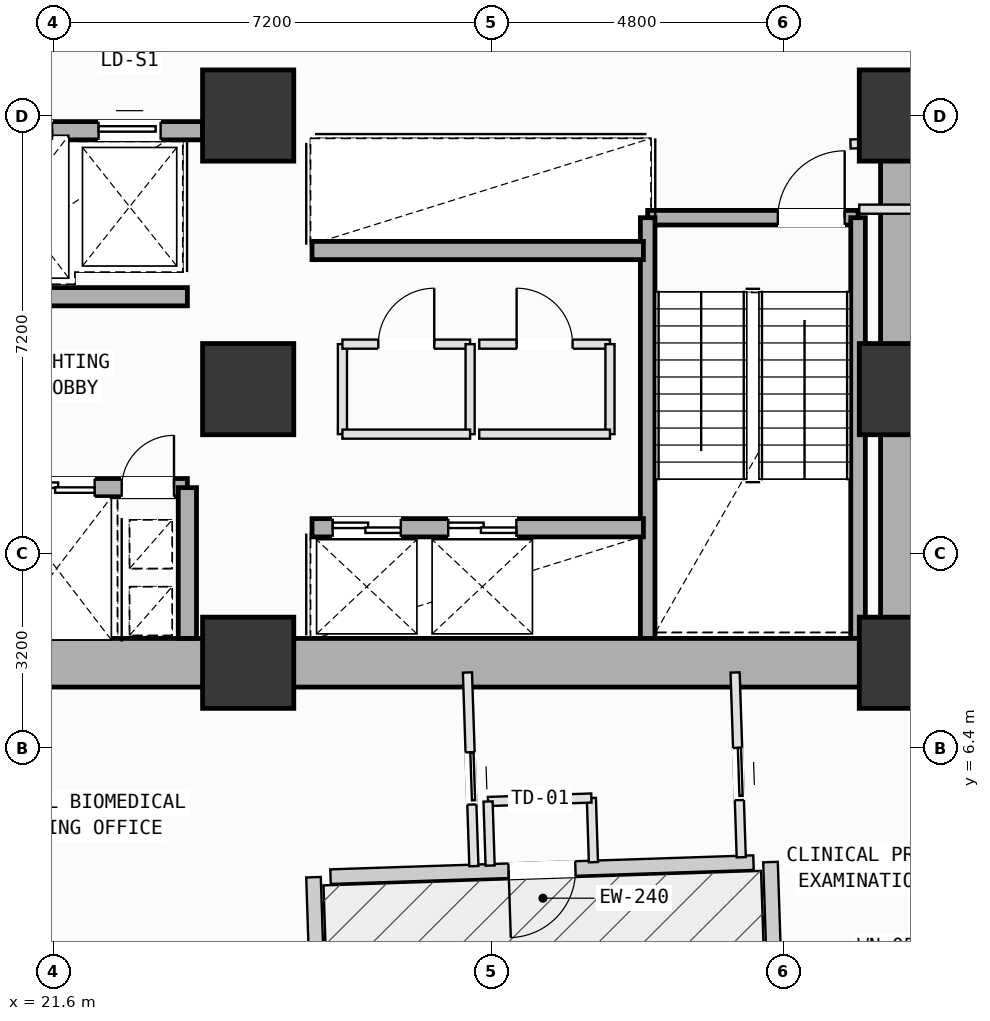
"""IFC4 building model, lengths in metres.
Left out: names, types, materials, properties, quantities, classifications, styles, units other than length and angle.
Written with IfcOpenShell. Run it as: python <this file> out.ifc"""

import sys

from ifc_helpers import new_model, si_unit, direction, frame, frame_2d, origin, origin_2d, place, context, subcontext, project, spatial, rectangle, extrude, element, fill, save


model = new_model("IFC4")
c1 = context("Model", 3, precision=1e-05, world=origin(), true_north=direction((0.0, 1.0)))
c2 = subcontext(c1, "Body", "Model", "MODEL_VIEW")
j1 = project(units=[si_unit("LENGTHUNIT", "METRE"), si_unit("PLANEANGLEUNIT", "RADIAN")], contexts=[c1])
p1 = place(None, origin())
s1 = spatial("IfcSite", under=j1, at=p1, CompositionType="ELEMENT")
p2 = place(p1, origin())
s2 = spatial("IfcBuilding", under=s1, at=p2, CompositionType="ELEMENT")
p3 = place(p2, frame((0.0, 0.0, 31.0)))
s3 = spatial("IfcBuildingStorey", under=s2, at=p3, CompositionType="ELEMENT", Elevation=31.0)
for number, where, z_axis, x_axis in (
    (1, (24.8, 7.8, 0.0), (0.0, 0.0, 1.0), (1.0, 0.0, 0.0)),
    (2, (24.8, 12.3, 0.0), (0.0, 0.0, 1.0), (1.0, 0.0, 0.0)),
    (3, (24.8, 16.8, 0.0), (0.0, 0.0, 1.0), (1.0, 0.0, 0.0)),
    (4, (35.6, 7.8, 0.0), (0.0, 0.0, 1.0), (1.0, 0.0, 0.0)),
    (5, (35.6, 12.3, 0.0), (0.0, 0.0, 1.0), (1.0, 0.0, 0.0)),
    (6, (35.6, 16.8, 0.0), (0.0, 0.0, 1.0), (1.0, 0.0, 0.0)),
):
    element("IfcColumn", number, at=place(p3, frame(where, z_axis=z_axis, x_axis=x_axis)), inside=s3, PredefinedType="COLUMN", context=c2, shape_type="SweptSolid", body=[
        extrude(rectangle(XDim=1.5, YDim=1.5, at=origin_2d()), origin(), (0.0, 0.0, 1.0), 4.0),
    ])
p4 = place(p3, frame((31.539, 2.469, 0.002), z_axis=(0.092271359153, -0.007785586006, 0.995703460339), x_axis=(0.051136235905, 0.998686967769, 0.003070144289)))
e7 = element("IfcColumn", 7, at=p4, inside=s3, PredefinedType="COLUMN", context=c2, shape_type="SweptSolid", body=[
    extrude(rectangle(XDim=1.6, YDim=0.9, at=origin_2d()), origin(), (0.0, 0.0, 1.0), 4.014),
])
p5 = place(p3, frame((33.11, 4.513, 0.0), z_axis=(0.0, 0.0, 1.0), x_axis=(-0.999450421649, -0.033148976852, 0.0)))
e8 = element("IfcWall", 8, at=p5, inside=s3, PredefinedType="SOLIDWALL", context=c2, shape_type="SweptSolid", body=[
    extrude(rectangle(XDim=6.96, YDim=0.24, at=frame_2d((3.48, 0.0))), origin(), (0.0, 0.0, 1.0), 3.165),
])
p6 = place(p5, frame((2.93, 0.0, 0.0)))
e9 = element("IfcOpeningElement", 9, at=p6, cuts=e8, PredefinedType="OPENING", context=c2, shape_type="SweptSolid", body=[
    extrude(rectangle(XDim=1.1, YDim=2.15, at=frame_2d((0.55, 1.075))), frame((0.0, 0.13, 0.0), z_axis=(0.0, -1.0, 0.0), x_axis=(1.0, 0.0, 0.0)), (0.0, 0.0, 1.0), 0.26),
])
for number, where, z_axis, x_axis in (
    (10, (25.874, 4.273, 0.0), (0.0, 0.0, 1.0), (0.033, -0.999, 0.0)),
    (11, (33.473, 2.023, 0.0), (0.0, 0.0, 1.0), (-0.033, 0.999, 0.0)),
):
    element("IfcWall", number, at=place(p3, frame(where, z_axis=z_axis, x_axis=x_axis)), inside=s3, PredefinedType="SOLIDWALL", context=c2, shape_type="SweptSolid", body=[
        extrude(rectangle(XDim=2.5, YDim=0.24, at=frame_2d((1.25, 0.0))), origin(), (0.0, 0.0, 1.0), 3.165),
    ])
p7 = place(p3, frame((31.37, 15.12, 0.0), z_axis=(0.0, 0.0, 1.0), x_axis=(1.0, 0.0, 0.0)))
e12 = element("IfcWall", 12, at=p7, inside=s3, PredefinedType="SOLIDWALL", context=c2, shape_type="SweptSolid", body=[
    extrude(rectangle(XDim=3.46, YDim=0.24, at=frame_2d((1.73, 0.0))), origin(), (0.0, 0.0, 1.0), 3.78),
])
p8 = place(p7, frame((2.14, 0.0, 0.0)))
e13 = element("IfcOpeningElement", 13, at=p8, cuts=e12, PredefinedType="OPENING", context=c2, shape_type="SweptSolid", body=[
    extrude(rectangle(XDim=1.1, YDim=2.15, at=frame_2d((0.55, 1.075))), frame((0.0, 0.13, 0.0), z_axis=(0.0, -1.0, 0.0), x_axis=(1.0, 0.0, 0.0)), (0.0, 0.0, 1.0), 0.26),
])
for number, where, z_axis, x_axis in (
    (14, (34.83, 15.12, 0.0), (0.0, 0.0, 1.0), (0.0, -1.0, 0.0)),
    (15, (31.37, 8.2, 0.0), (0.0, 0.0, 1.0), (0.0, 1.0, 0.0)),
):
    element("IfcWall", number, at=place(p3, frame(where, z_axis=z_axis, x_axis=x_axis)), inside=s3, PredefinedType="SOLIDWALL", context=c2, shape_type="SweptSolid", body=[
        extrude(rectangle(XDim=6.92, YDim=0.24, at=frame_2d((3.46, 0.0))), origin(), (0.0, 0.0, 1.0), 3.78),
    ])
for number, where, z_axis, x_axis in (
    (16, (14.0, 7.8, 0.0), (0.0, 0.0, 1.0), (1.0, 0.0, 0.0)),
    (17, (24.8, 7.8, 0.0), (0.0, 0.0, 1.0), (1.0, 0.0, 0.0)),
):
    element("IfcWall", number, at=place(p3, frame(where, z_axis=z_axis, x_axis=x_axis)), inside=s3, PredefinedType="SHEAR", context=c2, shape_type="SweptSolid", body=[
        extrude(rectangle(XDim=10.8, YDim=0.8, at=frame_2d((5.4, 0.0))), origin(), (0.0, 0.0, 1.0), 3.78),
    ])
p9 = place(p3, frame((35.6, 7.8, 0.0), z_axis=(0.0, 0.0, 1.0), x_axis=(0.0, 1.0, 0.0)))
e18 = element("IfcWall", 18, at=p9, inside=s3, PredefinedType="SHEAR", context=c2, shape_type="SweptSolid", body=[
    extrude(rectangle(XDim=9.0, YDim=0.8, at=frame_2d((4.5, 0.0))), origin(), (0.0, 0.0, 1.0), 3.78),
])
p10 = place(p3, frame((19.85, 16.55, 0.0), z_axis=(0.0, 0.0, 1.0), x_axis=(1.0, 0.0, 0.0)))
e19 = element("IfcWall", 19, at=p10, inside=s3, PredefinedType="SOLIDWALL", context=c2, shape_type="SweptSolid", body=[
    extrude(rectangle(XDim=4.2, YDim=0.3, at=frame_2d((2.1, 0.0))), origin(), (0.0, 0.0, 1.0), 3.78),
])
p11 = place(p10, frame((0.475, 0.0, 0.0)))
e20 = element("IfcOpeningElement", 20, at=p11, cuts=e19, PredefinedType="OPENING", context=c2, shape_type="SweptSolid", body=[
    extrude(rectangle(XDim=1.25, YDim=2.18, at=frame_2d((0.625, 1.09))), frame((0.0, 0.16, 0.0), z_axis=(0.0, -1.0, 0.0), x_axis=(1.0, 0.0, 0.0)), (0.0, 0.0, 1.0), 0.32),
])
p12 = place(p10, frame((2.49, 0.0, 0.0)))
e21 = element("IfcOpeningElement", 21, at=p12, cuts=e19, PredefinedType="OPENING", context=c2, shape_type="SweptSolid", body=[
    extrude(rectangle(XDim=1.02, YDim=2.12, at=frame_2d((0.51, 1.06))), frame((0.0, 0.16, 0.0), z_axis=(0.0, -1.0, 0.0), x_axis=(1.0, 0.0, 0.0)), (0.0, 0.0, 1.0), 0.32),
])
p13 = place(p3, frame((18.5, 10.68, 0.0), z_axis=(0.0, 0.0, 1.0), x_axis=(1.0, 0.0, 0.0)))
e22 = element("IfcWall", 22, at=p13, inside=s3, PredefinedType="SOLIDWALL", context=c2, shape_type="SweptSolid", body=[
    extrude(rectangle(XDim=5.3, YDim=0.3, at=frame_2d((2.65, 0.0))), origin(), (0.0, 0.0, 1.0), 3.78),
])
p14 = place(p13, frame((4.22, 0.0, 0.0)))
e23 = element("IfcOpeningElement", 23, at=p14, cuts=e22, PredefinedType="OPENING", context=c2, shape_type="SweptSolid", body=[
    extrude(rectangle(XDim=0.86, YDim=2.06, at=frame_2d((0.43, 1.03))), frame((0.0, 0.16, 0.0), z_axis=(0.0, -1.0, 0.0), x_axis=(1.0, 0.0, 0.0)), (0.0, 0.0, 1.0), 0.32),
])
p15 = place(p13, frame((0.425, 0.0, 0.0)))
e24 = element("IfcOpeningElement", 24, at=p15, cuts=e22, PredefinedType="OPENING", context=c2, shape_type="SweptSolid", body=[
    extrude(rectangle(XDim=1.25, YDim=2.18, at=frame_2d((0.625, 1.09))), frame((0.0, 0.16, 0.0), z_axis=(0.0, -1.0, 0.0), x_axis=(1.0, 0.0, 0.0)), (0.0, 0.0, 1.0), 0.32),
])
p16 = place(p13, frame((2.525, 0.0, 0.0)))
e25 = element("IfcOpeningElement", 25, at=p16, cuts=e22, PredefinedType="OPENING", context=c2, shape_type="SweptSolid", body=[
    extrude(rectangle(XDim=1.25, YDim=2.18, at=frame_2d((0.625, 1.09))), frame((0.0, 0.16, 0.0), z_axis=(0.0, -1.0, 0.0), x_axis=(1.0, 0.0, 0.0)), (0.0, 0.0, 1.0), 0.32),
])
p17 = place(p3, frame((18.5, 13.82, 0.0), z_axis=(0.0, 0.0, 1.0), x_axis=(1.0, 0.0, 0.0)))
e26 = element("IfcWall", 26, at=p17, inside=s3, PredefinedType="SOLIDWALL", context=c2, shape_type="SweptSolid", body=[
    extrude(rectangle(XDim=5.3, YDim=0.3, at=frame_2d((2.65, 0.0))), origin(), (0.0, 0.0, 1.0), 3.78),
])
p18 = place(p17, frame((0.18, 0.0, 0.0)))
e27 = element("IfcOpeningElement", 27, at=p18, cuts=e26, PredefinedType="OPENING", context=c2, shape_type="SweptSolid", body=[
    extrude(rectangle(XDim=1.1, YDim=2.15, at=frame_2d((0.55, 1.075))), frame((0.0, 0.16, 0.0), z_axis=(0.0, -1.0, 0.0), x_axis=(1.0, 0.0, 0.0)), (0.0, 0.0, 1.0), 0.32),
])
p19 = place(p3, frame((23.8, 8.2, 0.0), z_axis=(0.0, 0.0, 1.0), x_axis=(0.0, 1.0, 0.0)))
e28 = element("IfcWall", 28, at=p19, inside=s3, PredefinedType="SOLIDWALL", context=c2, shape_type="SweptSolid", body=[
    extrude(rectangle(XDim=2.48, YDim=0.3, at=frame_2d((1.24, 0.0))), origin(), (0.0, 0.0, 1.0), 3.78),
])
p20 = place(p3, frame((25.85, 10.02, 0.0), z_axis=(0.0, 0.0, 1.0), x_axis=(1.0, 0.0, 0.0)))
e29 = element("IfcWall", 29, at=p20, inside=s3, PredefinedType="SOLIDWALL", context=c2, shape_type="SweptSolid", body=[
    extrude(rectangle(XDim=5.45, YDim=0.3, at=frame_2d((2.725, 0.0))), origin(), (0.0, 0.0, 1.0), 3.78),
])
p21 = place(p20, frame((0.34, 0.0, 0.0)))
e30 = element("IfcOpeningElement", 30, at=p21, cuts=e29, PredefinedType="OPENING", context=c2, shape_type="SweptSolid", body=[
    extrude(rectangle(XDim=1.12, YDim=2.15, at=frame_2d((0.56, 1.075))), frame((0.0, 0.16, 0.0), z_axis=(0.0, -1.0, 0.0), x_axis=(1.0, 0.0, 0.0)), (0.0, 0.0, 1.0), 0.32),
])
p22 = place(p20, frame((2.24, 0.0, 0.0)))
e31 = element("IfcOpeningElement", 31, at=p22, cuts=e29, PredefinedType="OPENING", context=c2, shape_type="SweptSolid", body=[
    extrude(rectangle(XDim=1.12, YDim=2.15, at=frame_2d((0.56, 1.075))), frame((0.0, 0.16, 0.0), z_axis=(0.0, -1.0, 0.0), x_axis=(1.0, 0.0, 0.0)), (0.0, 0.0, 1.0), 0.32),
])
p23 = place(p3, frame((25.85, 14.58, 0.0), z_axis=(0.0, 0.0, 1.0), x_axis=(1.0, 0.0, 0.0)))
e32 = element("IfcWall", 32, at=p23, inside=s3, PredefinedType="SOLIDWALL", context=c2, shape_type="SweptSolid", body=[
    extrude(rectangle(XDim=5.45, YDim=0.3, at=frame_2d((2.725, 0.0))), origin(), (0.0, 0.0, 1.0), 3.78),
])
p24 = place(p3, frame((26.35, 11.56, 0.0), z_axis=(0.0, 0.0, 1.0), x_axis=(0.0, 1.0, 0.0)))
e33 = element("IfcWall", 33, at=p24, inside=s3, PredefinedType="PARTITIONING", context=c2, shape_type="SweptSolid", body=[
    extrude(rectangle(XDim=1.48, YDim=0.15, at=frame_2d((0.74, 0.0))), origin(), (0.0, 0.0, 1.0), 3.78),
])
p25 = place(p3, frame((26.35, 13.04, 0.0), z_axis=(0.0, 0.0, 1.0), x_axis=(1.0, 0.0, 0.0)))
e34 = element("IfcWall", 34, at=p25, inside=s3, PredefinedType="PARTITIONING", context=c2, shape_type="SweptSolid", body=[
    extrude(rectangle(XDim=2.1, YDim=0.15, at=frame_2d((1.05, 0.0))), origin(), (0.0, 0.0, 1.0), 3.78),
])
p26 = place(p25, frame((0.59, 0.0, 0.0)))
e35 = element("IfcOpeningElement", 35, at=p26, cuts=e34, PredefinedType="OPENING", context=c2, shape_type="SweptSolid", body=[
    extrude(rectangle(XDim=0.92, YDim=2.1, at=frame_2d((0.46, 1.05))), frame((0.0, 0.085, 0.0), z_axis=(0.0, -1.0, 0.0), x_axis=(1.0, 0.0, 0.0)), (0.0, 0.0, 1.0), 0.17),
])
p27 = place(p3, frame((28.45, 13.04, 0.0), z_axis=(0.0, 0.0, 1.0), x_axis=(0.0, -1.0, 0.0)))
e36 = element("IfcWall", 36, at=p27, inside=s3, PredefinedType="PARTITIONING", context=c2, shape_type="SweptSolid", body=[
    extrude(rectangle(XDim=1.48, YDim=0.15, at=frame_2d((0.74, 0.0))), origin(), (0.0, 0.0, 1.0), 3.78),
])
p28 = place(p3, frame((28.45, 11.56, 0.0), z_axis=(0.0, 0.0, 1.0), x_axis=(-1.0, 0.0, 0.0)))
e37 = element("IfcWall", 37, at=p28, inside=s3, PredefinedType="PARTITIONING", context=c2, shape_type="SweptSolid", body=[
    extrude(rectangle(XDim=2.1, YDim=0.15, at=frame_2d((1.05, 0.0))), origin(), (0.0, 0.0, 1.0), 3.78),
])
p29 = place(p3, frame((28.6, 13.04, 0.0), z_axis=(0.0, 0.0, 1.0), x_axis=(1.0, 0.0, 0.0)))
e38 = element("IfcWall", 38, at=p29, inside=s3, PredefinedType="PARTITIONING", context=c2, shape_type="SweptSolid", body=[
    extrude(rectangle(XDim=2.15, YDim=0.15, at=frame_2d((1.075, 0.0))), origin(), (0.0, 0.0, 1.0), 3.78),
])
p30 = place(p29, frame((0.615, 0.0, 0.0)))
e39 = element("IfcOpeningElement", 39, at=p30, cuts=e38, PredefinedType="OPENING", context=c2, shape_type="SweptSolid", body=[
    extrude(rectangle(XDim=0.92, YDim=2.1, at=frame_2d((0.46, 1.05))), frame((0.0, 0.085, 0.0), z_axis=(0.0, -1.0, 0.0), x_axis=(1.0, 0.0, 0.0)), (0.0, 0.0, 1.0), 0.17),
])
p31 = place(p3, frame((30.75, 13.04, 0.0), z_axis=(0.0, 0.0, 1.0), x_axis=(0.0, -1.0, 0.0)))
e40 = element("IfcWall", 40, at=p31, inside=s3, PredefinedType="PARTITIONING", context=c2, shape_type="SweptSolid", body=[
    extrude(rectangle(XDim=1.48, YDim=0.15, at=frame_2d((0.74, 0.0))), origin(), (0.0, 0.0, 1.0), 3.78),
])
p32 = place(p3, frame((30.75, 11.56, 0.0), z_axis=(0.0, 0.0, 1.0), x_axis=(-1.0, 0.0, 0.0)))
e41 = element("IfcWall", 41, at=p32, inside=s3, PredefinedType="PARTITIONING", context=c2, shape_type="SweptSolid", body=[
    extrude(rectangle(XDim=2.15, YDim=0.15, at=frame_2d((1.075, 0.0))), origin(), (0.0, 0.0, 1.0), 3.78),
])
p33 = place(p3, frame((28.406, 7.64, 0.0), z_axis=(0.0, 0.0, 1.0), x_axis=(0.033251054915, -0.999447030786, 0.0)))
e42 = element("IfcWall", 42, at=p33, inside=s3, PredefinedType="PARTITIONING", context=c2, shape_type="SweptSolid", body=[
    extrude(rectangle(XDim=3.187, YDim=0.15, at=frame_2d((1.593, 0.0))), origin(), (0.0, 0.0, 1.0), 3.78),
])
p34 = place(p33, frame((1.313, 0.0, 0.0)))
e43 = element("IfcOpeningElement", 43, at=p34, cuts=e42, PredefinedType="OPENING", context=c2, shape_type="SweptSolid", body=[
    extrude(rectangle(XDim=0.86, YDim=2.06, at=frame_2d((0.43, 1.03))), frame((0.0, 0.085, 0.0), z_axis=(0.0, -1.0, 0.0), x_axis=(1.0, 0.0, 0.0)), (0.0, 0.0, 1.0), 0.17),
])
p35 = place(p3, frame((32.808, 7.64, 0.0), z_axis=(0.0, 0.0, 1.0), x_axis=(0.033162435907, -0.999449975159, 0.0)))
e44 = element("IfcWall", 44, at=p35, inside=s3, PredefinedType="PARTITIONING", context=c2, shape_type="SweptSolid", body=[
    extrude(rectangle(XDim=3.041, YDim=0.15, at=frame_2d((1.52, 0.0))), origin(), (0.0, 0.0, 1.0), 3.78),
])
p36 = place(p35, frame((1.24, 0.0, 0.0)))
e45 = element("IfcOpeningElement", 45, at=p36, cuts=e44, PredefinedType="OPENING", context=c2, shape_type="SweptSolid", body=[
    extrude(rectangle(XDim=0.86, YDim=2.06, at=frame_2d((0.43, 1.03))), frame((0.0, 0.085, 0.0), z_axis=(0.0, -1.0, 0.0), x_axis=(1.0, 0.0, 0.0)), (0.0, 0.0, 1.0), 0.17),
])
p37 = place(p3, frame((30.478, 4.52, 0.0), z_axis=(0.0, 0.0, 1.0), x_axis=(-0.032151848276, 0.999482995679, 0.0)))
e46 = element("IfcWall", 46, at=p37, inside=s3, PredefinedType="PARTITIONING", context=c2, shape_type="SweptSolid", body=[
    extrude(rectangle(XDim=1.055, YDim=0.15, at=frame_2d((0.528, 0.0))), origin(), (0.0, 0.0, 1.0), 3.78),
])
p38 = place(p3, frame((30.444, 5.575, 0.0), z_axis=(0.0, 0.0, 1.0), x_axis=(-0.999439954622, -0.033463070761, 0.0)))
e47 = element("IfcWall", 47, at=p38, inside=s3, PredefinedType="PARTITIONING", context=c2, shape_type="SweptSolid", body=[
    extrude(rectangle(XDim=1.7, YDim=0.15, at=frame_2d((0.85, 0.0))), origin(), (0.0, 0.0, 1.0), 3.78),
])
p39 = place(p3, frame((28.745, 5.518, 0.0), z_axis=(0.0, 0.0, 1.0), x_axis=(0.032181608355, -0.999482037899, 0.0)))
e48 = element("IfcWall", 48, at=p39, inside=s3, PredefinedType="PARTITIONING", context=c2, shape_type="SweptSolid", body=[
    extrude(rectangle(XDim=1.054, YDim=0.15, at=frame_2d((0.527, 0.0))), origin(), (0.0, 0.0, 1.0), 3.78),
])
p40 = place(p3, frame((35.6, 7.5, 0.0), z_axis=(0.0, 0.0, 1.0), x_axis=(1.0, 0.0, 0.0)))
e49 = element("IfcWall", 49, at=p40, inside=s3, PredefinedType="PARTITIONING", context=c2, shape_type="SweptSolid", body=[
    extrude(rectangle(XDim=0.55, YDim=0.15, at=frame_2d((0.275, 0.0))), origin(), (0.0, 0.0, 1.0), 2.865),
])
p41 = place(p3, frame((36.15, 15.26, 0.0), z_axis=(0.0, 0.0, 1.0), x_axis=(-1.0, 0.0, 0.0)))
e50 = element("IfcWall", 50, at=p41, inside=s3, PredefinedType="PARTITIONING", context=c2, shape_type="SweptSolid", body=[
    extrude(rectangle(XDim=1.3, YDim=0.15, at=frame_2d((0.65, 0.0))), origin(), (0.0, 0.0, 1.0), 3.78),
])
p42 = place(p3, frame((34.706, 16.332, 0.0), z_axis=(0.0, 0.0, 1.0), x_axis=(0.999448179147, 0.033216519986, 0.0)))
e51 = element("IfcWall", 51, at=p42, inside=s3, PredefinedType="PARTITIONING", context=c2, shape_type="SweptSolid", body=[
    extrude(rectangle(XDim=2.315, YDim=0.15, at=frame_2d((1.158, 0.0))), origin(), (0.0, 0.0, 1.0), 2.865),
])
p43 = place(p6, origin())
e52 = element("IfcDoor", 52, at=p43, inside=s3, OperationType="SINGLE_SWING_RIGHT", PredefinedType="DOOR", context=c2, shape_type="SweptSolid", body=[
    extrude(rectangle(XDim=1.1, YDim=2.15, at=frame_2d((0.55, 1.075))), frame((0.0, 0.025, 0.0), z_axis=(0.0, -1.0, 0.0), x_axis=(1.0, 0.0, 0.0)), (0.0, 0.0, 1.0), 0.05),
])
fill(e9, e52)
p44 = place(p8, origin())
e53 = element("IfcDoor", 53, at=p44, inside=s3, OperationType="SINGLE_SWING_RIGHT", PredefinedType="DOOR", context=c2, shape_type="SweptSolid", body=[
    extrude(rectangle(XDim=1.1, YDim=2.15, at=frame_2d((0.55, 1.075))), frame((0.0, 0.025, 0.0), z_axis=(0.0, -1.0, 0.0), x_axis=(1.0, 0.0, 0.0)), (0.0, 0.0, 1.0), 0.05),
])
fill(e13, e53)
p45 = place(p14, origin())
e54 = element("IfcDoor", 54, at=p45, inside=s3, OperationType="SINGLE_SWING_RIGHT", PredefinedType="DOOR", context=c2, shape_type="SweptSolid", body=[
    extrude(rectangle(XDim=0.86, YDim=2.06, at=frame_2d((0.43, 1.03))), frame((0.0, 0.025, 0.0), z_axis=(0.0, -1.0, 0.0), x_axis=(1.0, 0.0, 0.0)), (0.0, 0.0, 1.0), 0.05),
])
fill(e23, e54)
p46 = place(p16, origin())
e55 = element("IfcDoor", 55, at=p46, inside=s3, OperationType="DOUBLE_DOOR_SLIDING", PredefinedType="DOOR", context=c2, shape_type="SweptSolid", body=[
    extrude(rectangle(XDim=1.25, YDim=2.18, at=frame_2d((0.625, 1.09))), frame((0.0, 0.025, 0.0), z_axis=(0.0, -1.0, 0.0), x_axis=(1.0, 0.0, 0.0)), (0.0, 0.0, 1.0), 0.05),
])
fill(e25, e55)
p47 = place(p21, origin())
e56 = element("IfcDoor", 56, at=p47, inside=s3, OperationType="DOUBLE_DOOR_SLIDING", PredefinedType="DOOR", context=c2, shape_type="SweptSolid", body=[
    extrude(rectangle(XDim=1.12, YDim=2.15, at=frame_2d((0.56, 1.075))), frame((0.0, 0.025, 0.0), z_axis=(0.0, -1.0, 0.0), x_axis=(1.0, 0.0, 0.0)), (0.0, 0.0, 1.0), 0.05),
])
fill(e30, e56)
p48 = place(p22, origin())
e57 = element("IfcDoor", 57, at=p48, inside=s3, OperationType="DOUBLE_DOOR_SLIDING", PredefinedType="DOOR", context=c2, shape_type="SweptSolid", body=[
    extrude(rectangle(XDim=1.12, YDim=2.15, at=frame_2d((0.56, 1.075))), frame((0.0, 0.025, 0.0), z_axis=(0.0, -1.0, 0.0), x_axis=(1.0, 0.0, 0.0)), (0.0, 0.0, 1.0), 0.05),
])
fill(e31, e57)
p49 = place(p12, origin())
e58 = element("IfcDoor", 58, at=p49, inside=s3, OperationType="SLIDING_TO_LEFT", PredefinedType="DOOR", context=c2, shape_type="SweptSolid", body=[
    extrude(rectangle(XDim=1.02, YDim=2.12, at=frame_2d((0.51, 1.06))), frame((0.0, 0.025, 0.0), z_axis=(0.0, -1.0, 0.0), x_axis=(1.0, 0.0, 0.0)), (0.0, 0.0, 1.0), 0.05),
])
fill(e21, e58)
p50 = place(p26, origin())
e59 = element("IfcDoor", 59, at=p50, inside=s3, OperationType="SINGLE_SWING_RIGHT", PredefinedType="DOOR", context=c2, shape_type="SweptSolid", body=[
    extrude(rectangle(XDim=0.92, YDim=2.1, at=frame_2d((0.46, 1.05))), frame((0.0, 0.025, 0.0), z_axis=(0.0, -1.0, 0.0), x_axis=(1.0, 0.0, 0.0)), (0.0, 0.0, 1.0), 0.05),
])
fill(e35, e59)
p51 = place(p30, origin())
e60 = element("IfcDoor", 60, at=p51, inside=s3, OperationType="SINGLE_SWING_LEFT", PredefinedType="DOOR", context=c2, shape_type="SweptSolid", body=[
    extrude(rectangle(XDim=0.92, YDim=2.1, at=frame_2d((0.46, 1.05))), frame((0.0, 0.025, 0.0), z_axis=(0.0, -1.0, 0.0), x_axis=(1.0, 0.0, 0.0)), (0.0, 0.0, 1.0), 0.05),
])
fill(e39, e60)
p52 = place(p36, origin())
e61 = element("IfcDoor", 61, at=p52, inside=s3, OperationType="SLIDING_TO_LEFT", PredefinedType="DOOR", context=c2, shape_type="SweptSolid", body=[
    extrude(rectangle(XDim=0.86, YDim=2.06, at=frame_2d((0.43, 1.03))), frame((0.0, 0.025, 0.0), z_axis=(0.0, -1.0, 0.0), x_axis=(1.0, 0.0, 0.0)), (0.0, 0.0, 1.0), 0.05),
])
fill(e45, e61)
p53 = place(p34, origin())
e62 = element("IfcDoor", 62, at=p53, inside=s3, OperationType="SLIDING_TO_LEFT", PredefinedType="DOOR", context=c2, shape_type="SweptSolid", body=[
    extrude(rectangle(XDim=0.86, YDim=2.06, at=frame_2d((0.43, 1.03))), frame((0.0, 0.025, 0.0), z_axis=(0.0, -1.0, 0.0), x_axis=(1.0, 0.0, 0.0)), (0.0, 0.0, 1.0), 0.05),
])
fill(e43, e62)
save(model, sys.argv[1])
